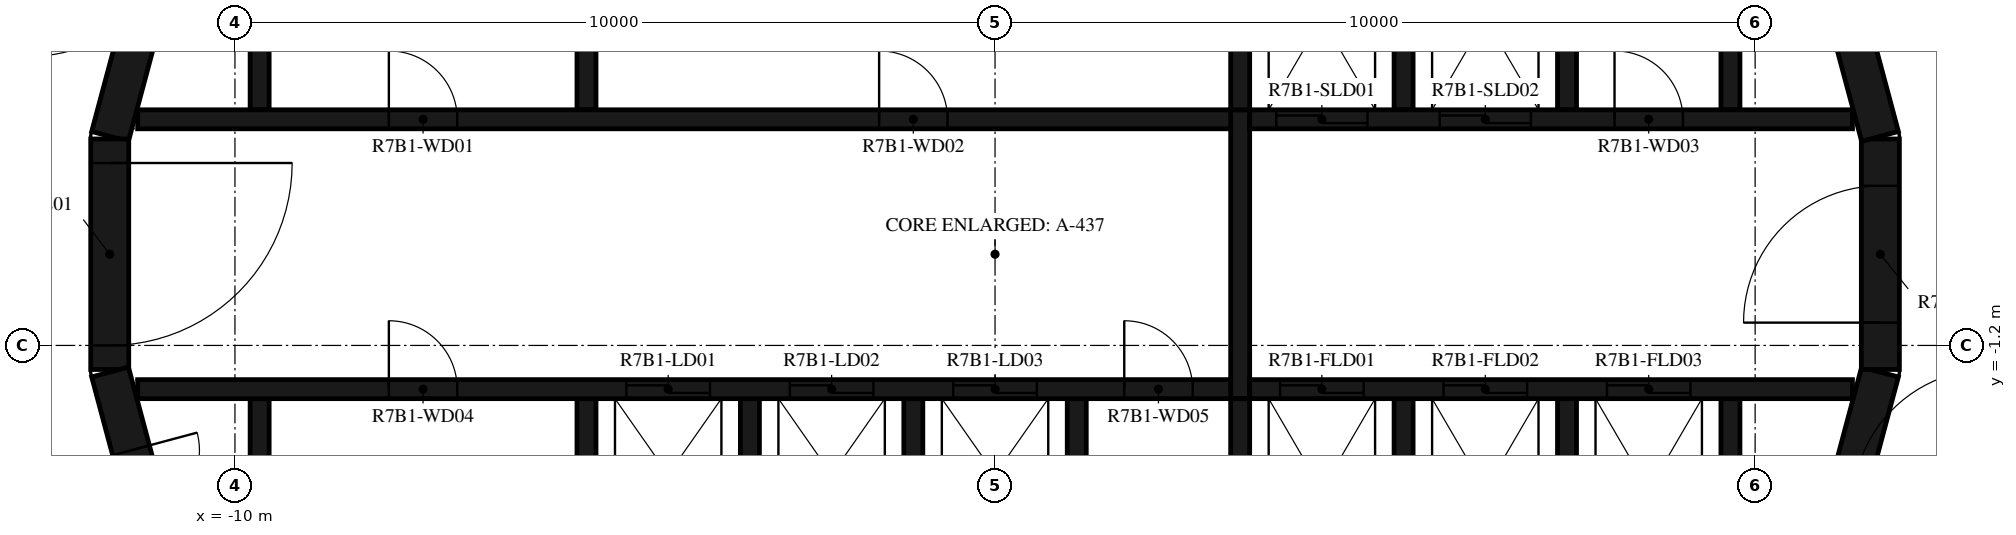
"""IFC4 building model, lengths in metres.
Left out: names, types, materials, properties, quantities, classifications, styles, units other than length and angle.
Written with IfcOpenShell. Run it as: python <this file> out.ifc"""

import sys

from ifc_helpers import new_model, si_unit, direction, frame, frame_2d, origin, place, context, subcontext, project, spatial, polyline, rectangle, outline, extrude, element, fill, save


model = new_model("IFC4")
c1 = context("Model", 3, precision=1e-05, world=origin(), true_north=direction((0.0, 1.0)))
c2 = subcontext(c1, "Body", "Model", "MODEL_VIEW")
j1 = project(units=[si_unit("LENGTHUNIT", "METRE"), si_unit("PLANEANGLEUNIT", "RADIAN")], contexts=[c1])
p1 = place(None, origin())
s1 = spatial("IfcSite", under=j1, at=p1, CompositionType="ELEMENT")
p2 = place(p1, origin())
s2 = spatial("IfcBuilding", under=s1, at=p2, CompositionType="ELEMENT")
p3 = place(p2, frame((0.0, 0.0, 273.9)))
s3 = spatial("IfcBuildingStorey", under=s2, at=p3, CompositionType="ELEMENT", Elevation=273.9)
p4 = place(p3, frame((10.858, -4.479, 0.0), z_axis=(0.0, 0.0, 1.0), x_axis=(0.258734743916, 0.965948410781, 0.0)))
e1 = element("IfcWall", 1, at=p4, inside=s3, PredefinedType="SHEAR", context=c2, shape_type="SweptSolid", body=[
    extrude(rectangle(XDim=3.033, YDim=0.5, at=frame_2d((1.516, 0.0))), origin(), (0.0, 0.0, 1.0), 3.12),
])
p5 = place(p3, frame((11.647, -1.516, 0.0), z_axis=(0.0, 0.0, 1.0), x_axis=(0.0, 1.0, 0.0)))
e2 = element("IfcWall", 2, at=p5, inside=s3, PredefinedType="SHEAR", context=c2, shape_type="SweptSolid", body=[
    extrude(rectangle(XDim=3.033, YDim=0.5, at=frame_2d((1.516, 0.0))), origin(), (0.0, 0.0, 1.0), 3.12),
])
p6 = place(p5, frame((0.616, 0.0, 0.0)))
e3 = element("IfcOpeningElement", 3, at=p6, cuts=e2, PredefinedType="OPENING", context=c2, shape_type="SweptSolid", body=[
    extrude(rectangle(XDim=1.8, YDim=2.1, at=frame_2d((0.9, 1.05))), frame((0.0, 0.26, 0.0), z_axis=(0.0, -1.0, 0.0), x_axis=(1.0, 0.0, 0.0)), (0.0, 0.0, 1.0), 0.52),
])
for number, where, z_axis, x_axis in (
    (4, (11.643, 1.55, 0.0), (0.0, 0.0, 1.0), (-0.259, 0.966, 0.0)),
    (5, (-10.858, 4.479, 0.0), (0.0, 0.0, 1.0), (-0.259, -0.966, 0.0)),
):
    element("IfcWall", number, at=place(p3, frame(where, z_axis=z_axis, x_axis=x_axis)), inside=s3, PredefinedType="SHEAR", context=c2, shape_type="SweptSolid", body=[
        extrude(rectangle(XDim=3.033, YDim=0.5, at=frame_2d((1.516, 0.0))), origin(), (0.0, 0.0, 1.0), 3.12),
    ])
p7 = place(p3, frame((-11.647, 1.516, 0.0), z_axis=(0.0, 0.0, 1.0), x_axis=(0.0, -1.0, 0.0)))
e6 = element("IfcWall", 6, at=p7, inside=s3, PredefinedType="SHEAR", context=c2, shape_type="SweptSolid", body=[
    extrude(rectangle(XDim=3.033, YDim=0.5, at=frame_2d((1.516, 0.0))), origin(), (0.0, 0.0, 1.0), 3.12),
])
p8 = place(p7, frame((0.316, 0.0, 0.0)))
e7 = element("IfcOpeningElement", 7, at=p8, cuts=e6, PredefinedType="OPENING", context=c2, shape_type="SweptSolid", body=[
    extrude(rectangle(XDim=2.4, YDim=2.1, at=frame_2d((1.2, 1.05))), frame((0.0, 0.26, 0.0), z_axis=(0.0, -1.0, 0.0), x_axis=(1.0, 0.0, 0.0)), (0.0, 0.0, 1.0), 0.52),
])
p9 = place(p3, frame((-11.643, -1.55, 0.0), z_axis=(0.0, 0.0, 1.0), x_axis=(0.258734743916, -0.965948410781, 0.0)))
e8 = element("IfcWall", 8, at=p9, inside=s3, PredefinedType="SHEAR", context=c2, shape_type="SweptSolid", body=[
    extrude(rectangle(XDim=3.033, YDim=0.5, at=frame_2d((1.516, 0.0))), origin(), (0.0, 0.0, 1.0), 3.12),
])
p10 = place(p9, frame((1.066, 0.0, 0.0)))
e9 = element("IfcOpeningElement", 9, at=p10, cuts=e8, PredefinedType="OPENING", context=c2, shape_type="SweptSolid", body=[
    extrude(rectangle(XDim=0.9, YDim=2.1, at=frame_2d((0.45, 1.05))), frame((0.0, 0.26, 0.0), z_axis=(0.0, -1.0, 0.0), x_axis=(1.0, 0.0, 0.0)), (0.0, 0.0, 1.0), 0.52),
])
p11 = place(p3, origin())
e10 = element("IfcWall", 10, at=p11, inside=s3, PredefinedType="SHEAR", context=c2, shape_type="SweptSolid", body=[
    extrude(outline(polyline([(-9.8, 1.9), (-9.55, 1.9), (-9.55, 4.8), (-5.5, 4.8), (-5.5, 1.9), (-5.25, 1.9), (-5.25, 4.8), (3.1, 4.8), (3.1, 1.9), (3.35, 1.9), (3.35, 4.8), (5.25, 4.8), (5.25, 1.9), (5.5, 1.9), (5.5, 4.8), (7.4, 4.8), (7.4, 1.9), (7.65, 1.9), (7.65, 4.8), (9.55, 4.8), (9.55, 1.9), (9.8, 1.9), (9.8, 4.8), (9.8, 5.05), (-9.8, 5.05), (-9.8, 4.8), (-9.8, 1.9)])), origin(), (0.0, 0.0, 1.0), 3.12),
])
p12 = place(p3, origin())
e11 = element("IfcWall", 11, at=p12, inside=s3, PredefinedType="SHEAR", context=c2, shape_type="SweptSolid", body=[
    extrude(outline(polyline([(9.8, -5.05), (9.8, -4.8), (9.8, -1.9), (9.55, -1.9), (9.55, -4.8), (7.65, -4.8), (7.65, -1.9), (7.4, -1.9), (7.4, -4.8), (5.5, -4.8), (5.5, -1.9), (5.25, -1.9), (5.25, -4.8), (3.35, -4.8), (3.35, -1.9), (3.1, -1.9), (3.1, -4.8), (1.2, -4.8), (1.2, -1.9), (0.95, -1.9), (0.95, -4.8), (-0.95, -4.8), (-0.95, -1.9), (-1.2, -1.9), (-1.2, -4.8), (-3.1, -4.8), (-3.1, -1.9), (-3.35, -1.9), (-3.35, -4.8), (-5.25, -4.8), (-5.25, -1.9), (-5.5, -1.9), (-5.5, -4.8), (-9.55, -4.8), (-9.55, -1.9), (-9.8, -1.9), (-9.8, -4.8), (-9.8, -5.05), (9.8, -5.05)])), origin(), (0.0, 0.0, 1.0), 3.12),
])
p13 = place(p3, frame((-11.28, 1.775, 0.0), z_axis=(0.0, 0.0, 1.0), x_axis=(1.0, 0.0, 0.0)))
e12 = element("IfcWall", 12, at=p13, inside=s3, PredefinedType="SHEAR", context=c2, shape_type="SweptSolid", body=[
    extrude(rectangle(XDim=14.38, YDim=0.25, at=frame_2d((7.19, 0.0))), origin(), (0.0, 0.0, 1.0), 3.12),
])
p14 = place(p13, frame((3.305, 0.0, 0.0)))
e13 = element("IfcOpeningElement", 13, at=p14, cuts=e12, PredefinedType="OPENING", context=c2, shape_type="SweptSolid", body=[
    extrude(rectangle(XDim=0.9, YDim=2.1, at=frame_2d((0.45, 1.05))), frame((0.0, 0.135, 0.0), z_axis=(0.0, -1.0, 0.0), x_axis=(1.0, 0.0, 0.0)), (0.0, 0.0, 1.0), 0.27),
])
p15 = place(p13, frame((9.755, 0.0, 0.0)))
e14 = element("IfcOpeningElement", 14, at=p15, cuts=e12, PredefinedType="OPENING", context=c2, shape_type="SweptSolid", body=[
    extrude(rectangle(XDim=0.9, YDim=2.1, at=frame_2d((0.45, 1.05))), frame((0.0, 0.135, 0.0), z_axis=(0.0, -1.0, 0.0), x_axis=(1.0, 0.0, 0.0)), (0.0, 0.0, 1.0), 0.27),
])
p16 = place(p3, frame((3.35, 1.775, 0.0), z_axis=(0.0, 0.0, 1.0), x_axis=(1.0, 0.0, 0.0)))
e15 = element("IfcWall", 15, at=p16, inside=s3, PredefinedType="SHEAR", context=c2, shape_type="SweptSolid", body=[
    extrude(rectangle(XDim=7.93, YDim=0.25, at=frame_2d((3.965, 0.0))), origin(), (0.0, 0.0, 1.0), 3.12),
])
p17 = place(p16, frame((0.35, 0.0, 0.0)))
e16 = element("IfcOpeningElement", 16, at=p17, cuts=e15, PredefinedType="OPENING", context=c2, shape_type="SweptSolid", body=[
    extrude(rectangle(XDim=1.2, YDim=2.4, at=frame_2d((0.6, 1.2))), frame((0.0, 0.135, 0.0), z_axis=(0.0, -1.0, 0.0), x_axis=(1.0, 0.0, 0.0)), (0.0, 0.0, 1.0), 0.27),
])
p18 = place(p16, frame((2.5, 0.0, 0.0)))
e17 = element("IfcOpeningElement", 17, at=p18, cuts=e15, PredefinedType="OPENING", context=c2, shape_type="SweptSolid", body=[
    extrude(rectangle(XDim=1.2, YDim=2.4, at=frame_2d((0.6, 1.2))), frame((0.0, 0.135, 0.0), z_axis=(0.0, -1.0, 0.0), x_axis=(1.0, 0.0, 0.0)), (0.0, 0.0, 1.0), 0.27),
])
p19 = place(p16, frame((4.8, 0.0, 0.0)))
e18 = element("IfcOpeningElement", 18, at=p19, cuts=e15, PredefinedType="OPENING", context=c2, shape_type="SweptSolid", body=[
    extrude(rectangle(XDim=0.9, YDim=2.1, at=frame_2d((0.45, 1.05))), frame((0.0, 0.135, 0.0), z_axis=(0.0, -1.0, 0.0), x_axis=(1.0, 0.0, 0.0)), (0.0, 0.0, 1.0), 0.27),
])
p20 = place(p3, frame((-11.28, -1.775, 0.0), z_axis=(0.0, 0.0, 1.0), x_axis=(1.0, 0.0, 0.0)))
e19 = element("IfcWall", 19, at=p20, inside=s3, PredefinedType="SHEAR", context=c2, shape_type="SweptSolid", body=[
    extrude(rectangle(XDim=14.38, YDim=0.25, at=frame_2d((7.19, 0.0))), origin(), (0.0, 0.0, 1.0), 3.12),
])
p21 = place(p20, frame((6.43, 0.0, 0.0)))
e20 = element("IfcOpeningElement", 20, at=p21, cuts=e19, PredefinedType="OPENING", context=c2, shape_type="SweptSolid", body=[
    extrude(rectangle(XDim=1.1, YDim=2.1, at=frame_2d((0.55, 1.05))), frame((0.0, 0.135, 0.0), z_axis=(0.0, -1.0, 0.0), x_axis=(1.0, 0.0, 0.0)), (0.0, 0.0, 1.0), 0.27),
])
p22 = place(p20, frame((8.58, 0.0, 0.0)))
e21 = element("IfcOpeningElement", 21, at=p22, cuts=e19, PredefinedType="OPENING", context=c2, shape_type="SweptSolid", body=[
    extrude(rectangle(XDim=1.1, YDim=2.1, at=frame_2d((0.55, 1.05))), frame((0.0, 0.135, 0.0), z_axis=(0.0, -1.0, 0.0), x_axis=(1.0, 0.0, 0.0)), (0.0, 0.0, 1.0), 0.27),
])
p23 = place(p20, frame((10.73, 0.0, 0.0)))
e22 = element("IfcOpeningElement", 22, at=p23, cuts=e19, PredefinedType="OPENING", context=c2, shape_type="SweptSolid", body=[
    extrude(rectangle(XDim=1.1, YDim=2.1, at=frame_2d((0.55, 1.05))), frame((0.0, 0.135, 0.0), z_axis=(0.0, -1.0, 0.0), x_axis=(1.0, 0.0, 0.0)), (0.0, 0.0, 1.0), 0.27),
])
p24 = place(p20, frame((3.305, 0.0, 0.0)))
e23 = element("IfcOpeningElement", 23, at=p24, cuts=e19, PredefinedType="OPENING", context=c2, shape_type="SweptSolid", body=[
    extrude(rectangle(XDim=0.9, YDim=2.1, at=frame_2d((0.45, 1.05))), frame((0.0, 0.135, 0.0), z_axis=(0.0, -1.0, 0.0), x_axis=(1.0, 0.0, 0.0)), (0.0, 0.0, 1.0), 0.27),
])
p25 = place(p20, frame((12.98, 0.0, 0.0)))
e24 = element("IfcOpeningElement", 24, at=p25, cuts=e19, PredefinedType="OPENING", context=c2, shape_type="SweptSolid", body=[
    extrude(rectangle(XDim=0.9, YDim=2.1, at=frame_2d((0.45, 1.05))), frame((0.0, 0.135, 0.0), z_axis=(0.0, -1.0, 0.0), x_axis=(1.0, 0.0, 0.0)), (0.0, 0.0, 1.0), 0.27),
])
p26 = place(p3, frame((3.35, -1.775, 0.0), z_axis=(0.0, 0.0, 1.0), x_axis=(1.0, 0.0, 0.0)))
e25 = element("IfcWall", 25, at=p26, inside=s3, PredefinedType="SHEAR", context=c2, shape_type="SweptSolid", body=[
    extrude(rectangle(XDim=7.93, YDim=0.25, at=frame_2d((3.965, 0.0))), origin(), (0.0, 0.0, 1.0), 3.12),
])
p27 = place(p26, frame((0.4, 0.0, 0.0)))
e26 = element("IfcOpeningElement", 26, at=p27, cuts=e25, PredefinedType="OPENING", context=c2, shape_type="SweptSolid", body=[
    extrude(rectangle(XDim=1.1, YDim=2.4, at=frame_2d((0.55, 1.2))), frame((0.0, 0.135, 0.0), z_axis=(0.0, -1.0, 0.0), x_axis=(1.0, 0.0, 0.0)), (0.0, 0.0, 1.0), 0.27),
])
p28 = place(p26, frame((2.55, 0.0, 0.0)))
e27 = element("IfcOpeningElement", 27, at=p28, cuts=e25, PredefinedType="OPENING", context=c2, shape_type="SweptSolid", body=[
    extrude(rectangle(XDim=1.1, YDim=2.4, at=frame_2d((0.55, 1.2))), frame((0.0, 0.135, 0.0), z_axis=(0.0, -1.0, 0.0), x_axis=(1.0, 0.0, 0.0)), (0.0, 0.0, 1.0), 0.27),
])
p29 = place(p26, frame((4.7, 0.0, 0.0)))
e28 = element("IfcOpeningElement", 28, at=p29, cuts=e25, PredefinedType="OPENING", context=c2, shape_type="SweptSolid", body=[
    extrude(rectangle(XDim=1.1, YDim=2.4, at=frame_2d((0.55, 1.2))), frame((0.0, 0.135, 0.0), z_axis=(0.0, -1.0, 0.0), x_axis=(1.0, 0.0, 0.0)), (0.0, 0.0, 1.0), 0.27),
])
p30 = place(p3, frame((3.225, -1.9, 0.0), z_axis=(0.0, 0.0, 1.0), x_axis=(0.0, 1.0, 0.0)))
e29 = element("IfcWall", 29, at=p30, inside=s3, PredefinedType="SHEAR", context=c2, shape_type="SweptSolid", body=[
    extrude(rectangle(XDim=3.8, YDim=0.25, at=frame_2d((1.9, 0.0))), origin(), (0.0, 0.0, 1.0), 3.12),
])
p31 = place(p3, frame((11.223, -8.154, 0.0), z_axis=(0.0, 0.0, 1.0), x_axis=(0.358341090983, 0.93359073609, 0.0)))
e30 = element("IfcWall", 30, at=p31, inside=s3, PredefinedType="STANDARD", context=c2, shape_type="SweptSolid", body=[
    extrude(rectangle(XDim=7.181, YDim=0.2, at=frame_2d((3.59, 0.0))), origin(), (0.0, 0.0, 1.0), 3.12),
])
p32 = place(p31, frame((5.185, 0.0, 0.0)))
e31 = element("IfcOpeningElement", 31, at=p32, cuts=e30, PredefinedType="OPENING", context=c2, shape_type="SweptSolid", body=[
    extrude(rectangle(XDim=1.8, YDim=2.1, at=frame_2d((0.9, 1.05))), frame((0.0, 0.11, 0.0), z_axis=(0.0, -1.0, 0.0), x_axis=(1.0, 0.0, 0.0)), (0.0, 0.0, 1.0), 0.22),
])
p33 = place(p3, frame((-11.223, 8.154, 0.0), z_axis=(0.0, 0.0, 1.0), x_axis=(-0.358341090983, -0.93359073609, 0.0)))
e32 = element("IfcWall", 32, at=p33, inside=s3, PredefinedType="STANDARD", context=c2, shape_type="SweptSolid", body=[
    extrude(rectangle(XDim=7.181, YDim=0.2, at=frame_2d((3.59, 0.0))), origin(), (0.0, 0.0, 1.0), 3.12),
])
p34 = place(p33, frame((4.014, 0.0, 0.0)))
e33 = element("IfcOpeningElement", 33, at=p34, cuts=e32, PredefinedType="OPENING", context=c2, shape_type="SweptSolid", body=[
    extrude(rectangle(XDim=1.8, YDim=2.1, at=frame_2d((0.9, 1.05))), frame((0.0, 0.11, 0.0), z_axis=(0.0, -1.0, 0.0), x_axis=(1.0, 0.0, 0.0)), (0.0, 0.0, 1.0), 0.22),
])
p35 = place(p8, origin())
e34 = element("IfcDoor", 34, at=p35, inside=s3, OperationType="DOUBLE_DOOR_SINGLE_SWING", PredefinedType="DOOR", context=c2, shape_type="SweptSolid", body=[
    extrude(rectangle(XDim=2.4, YDim=2.1, at=frame_2d((1.2, 1.05))), frame((0.0, 0.025, 0.0), z_axis=(0.0, -1.0, 0.0), x_axis=(1.0, 0.0, 0.0)), (0.0, 0.0, 1.0), 0.05),
])
fill(e7, e34)
p36 = place(p6, origin())
e35 = element("IfcDoor", 35, at=p36, inside=s3, OperationType="DOUBLE_DOOR_SINGLE_SWING", PredefinedType="DOOR", context=c2, shape_type="SweptSolid", body=[
    extrude(rectangle(XDim=1.8, YDim=2.1, at=frame_2d((0.9, 1.05))), frame((0.0, 0.025, 0.0), z_axis=(0.0, -1.0, 0.0), x_axis=(1.0, 0.0, 0.0)), (0.0, 0.0, 1.0), 0.05),
])
fill(e3, e35)
p37 = place(p17, origin())
e36 = element("IfcDoor", 36, at=p37, inside=s3, OperationType="DOUBLE_DOOR_SLIDING", PredefinedType="DOOR", context=c2, shape_type="SweptSolid", body=[
    extrude(rectangle(XDim=1.2, YDim=2.4, at=frame_2d((0.6, 1.2))), frame((0.0, 0.025, 0.0), z_axis=(0.0, -1.0, 0.0), x_axis=(1.0, 0.0, 0.0)), (0.0, 0.0, 1.0), 0.05),
])
fill(e16, e36)
p38 = place(p18, origin())
e37 = element("IfcDoor", 37, at=p38, inside=s3, OperationType="DOUBLE_DOOR_SLIDING", PredefinedType="DOOR", context=c2, shape_type="SweptSolid", body=[
    extrude(rectangle(XDim=1.2, YDim=2.4, at=frame_2d((0.6, 1.2))), frame((0.0, 0.025, 0.0), z_axis=(0.0, -1.0, 0.0), x_axis=(1.0, 0.0, 0.0)), (0.0, 0.0, 1.0), 0.05),
])
fill(e17, e37)
p39 = place(p21, origin())
e38 = element("IfcDoor", 38, at=p39, inside=s3, OperationType="DOUBLE_DOOR_SLIDING", PredefinedType="DOOR", context=c2, shape_type="SweptSolid", body=[
    extrude(rectangle(XDim=1.1, YDim=2.1, at=frame_2d((0.55, 1.05))), frame((0.0, 0.025, 0.0), z_axis=(0.0, -1.0, 0.0), x_axis=(1.0, 0.0, 0.0)), (0.0, 0.0, 1.0), 0.05),
])
fill(e20, e38)
p40 = place(p22, origin())
e39 = element("IfcDoor", 39, at=p40, inside=s3, OperationType="DOUBLE_DOOR_SLIDING", PredefinedType="DOOR", context=c2, shape_type="SweptSolid", body=[
    extrude(rectangle(XDim=1.1, YDim=2.1, at=frame_2d((0.55, 1.05))), frame((0.0, 0.025, 0.0), z_axis=(0.0, -1.0, 0.0), x_axis=(1.0, 0.0, 0.0)), (0.0, 0.0, 1.0), 0.05),
])
fill(e21, e39)
p41 = place(p23, origin())
e40 = element("IfcDoor", 40, at=p41, inside=s3, OperationType="DOUBLE_DOOR_SLIDING", PredefinedType="DOOR", context=c2, shape_type="SweptSolid", body=[
    extrude(rectangle(XDim=1.1, YDim=2.1, at=frame_2d((0.55, 1.05))), frame((0.0, 0.025, 0.0), z_axis=(0.0, -1.0, 0.0), x_axis=(1.0, 0.0, 0.0)), (0.0, 0.0, 1.0), 0.05),
])
fill(e22, e40)
p42 = place(p27, origin())
e41 = element("IfcDoor", 41, at=p42, inside=s3, OperationType="DOUBLE_DOOR_SLIDING", PredefinedType="DOOR", context=c2, shape_type="SweptSolid", body=[
    extrude(rectangle(XDim=1.1, YDim=2.4, at=frame_2d((0.55, 1.2))), frame((0.0, 0.025, 0.0), z_axis=(0.0, -1.0, 0.0), x_axis=(1.0, 0.0, 0.0)), (0.0, 0.0, 1.0), 0.05),
])
fill(e26, e41)
p43 = place(p28, origin())
e42 = element("IfcDoor", 42, at=p43, inside=s3, OperationType="DOUBLE_DOOR_SLIDING", PredefinedType="DOOR", context=c2, shape_type="SweptSolid", body=[
    extrude(rectangle(XDim=1.1, YDim=2.4, at=frame_2d((0.55, 1.2))), frame((0.0, 0.025, 0.0), z_axis=(0.0, -1.0, 0.0), x_axis=(1.0, 0.0, 0.0)), (0.0, 0.0, 1.0), 0.05),
])
fill(e27, e42)
p44 = place(p29, origin())
e43 = element("IfcDoor", 43, at=p44, inside=s3, OperationType="DOUBLE_DOOR_SLIDING", PredefinedType="DOOR", context=c2, shape_type="SweptSolid", body=[
    extrude(rectangle(XDim=1.1, YDim=2.4, at=frame_2d((0.55, 1.2))), frame((0.0, 0.025, 0.0), z_axis=(0.0, -1.0, 0.0), x_axis=(1.0, 0.0, 0.0)), (0.0, 0.0, 1.0), 0.05),
])
fill(e28, e43)
p45 = place(p14, origin())
e44 = element("IfcDoor", 44, at=p45, inside=s3, OperationType="SINGLE_SWING_LEFT", PredefinedType="DOOR", context=c2, shape_type="SweptSolid", body=[
    extrude(rectangle(XDim=0.9, YDim=2.1, at=frame_2d((0.45, 1.05))), frame((0.0, 0.025, 0.0), z_axis=(0.0, -1.0, 0.0), x_axis=(1.0, 0.0, 0.0)), (0.0, 0.0, 1.0), 0.05),
])
fill(e13, e44)
p46 = place(p15, origin())
e45 = element("IfcDoor", 45, at=p46, inside=s3, OperationType="SINGLE_SWING_RIGHT", PredefinedType="DOOR", context=c2, shape_type="SweptSolid", body=[
    extrude(rectangle(XDim=0.9, YDim=2.1, at=frame_2d((0.45, 1.05))), frame((0.0, 0.025, 0.0), z_axis=(0.0, -1.0, 0.0), x_axis=(1.0, 0.0, 0.0)), (0.0, 0.0, 1.0), 0.05),
])
fill(e14, e45)
p47 = place(p19, origin())
e46 = element("IfcDoor", 46, at=p47, inside=s3, OperationType="SINGLE_SWING_LEFT", PredefinedType="DOOR", context=c2, shape_type="SweptSolid", body=[
    extrude(rectangle(XDim=0.9, YDim=2.1, at=frame_2d((0.45, 1.05))), frame((0.0, 0.025, 0.0), z_axis=(0.0, -1.0, 0.0), x_axis=(1.0, 0.0, 0.0)), (0.0, 0.0, 1.0), 0.05),
])
fill(e18, e46)
p48 = place(p24, origin())
e47 = element("IfcDoor", 47, at=p48, inside=s3, OperationType="SINGLE_SWING_RIGHT", PredefinedType="DOOR", context=c2, shape_type="SweptSolid", body=[
    extrude(rectangle(XDim=0.9, YDim=2.1, at=frame_2d((0.45, 1.05))), frame((0.0, 0.025, 0.0), z_axis=(0.0, -1.0, 0.0), x_axis=(1.0, 0.0, 0.0)), (0.0, 0.0, 1.0), 0.05),
])
fill(e23, e47)
p49 = place(p25, origin())
e48 = element("IfcDoor", 48, at=p49, inside=s3, OperationType="SINGLE_SWING_LEFT", PredefinedType="DOOR", context=c2, shape_type="SweptSolid", body=[
    extrude(rectangle(XDim=0.9, YDim=2.1, at=frame_2d((0.45, 1.05))), frame((0.0, 0.025, 0.0), z_axis=(0.0, -1.0, 0.0), x_axis=(1.0, 0.0, 0.0)), (0.0, 0.0, 1.0), 0.05),
])
fill(e24, e48)
p50 = place(p10, origin())
e49 = element("IfcDoor", 49, at=p50, inside=s3, OperationType="SINGLE_SWING_RIGHT", PredefinedType="DOOR", context=c2, shape_type="SweptSolid", body=[
    extrude(rectangle(XDim=0.9, YDim=2.1, at=frame_2d((0.45, 1.05))), frame((0.0, 0.025, 0.0), z_axis=(0.0, -1.0, 0.0), x_axis=(1.0, 0.0, 0.0)), (0.0, 0.0, 1.0), 0.05),
])
fill(e9, e49)
save(model, sys.argv[1])
